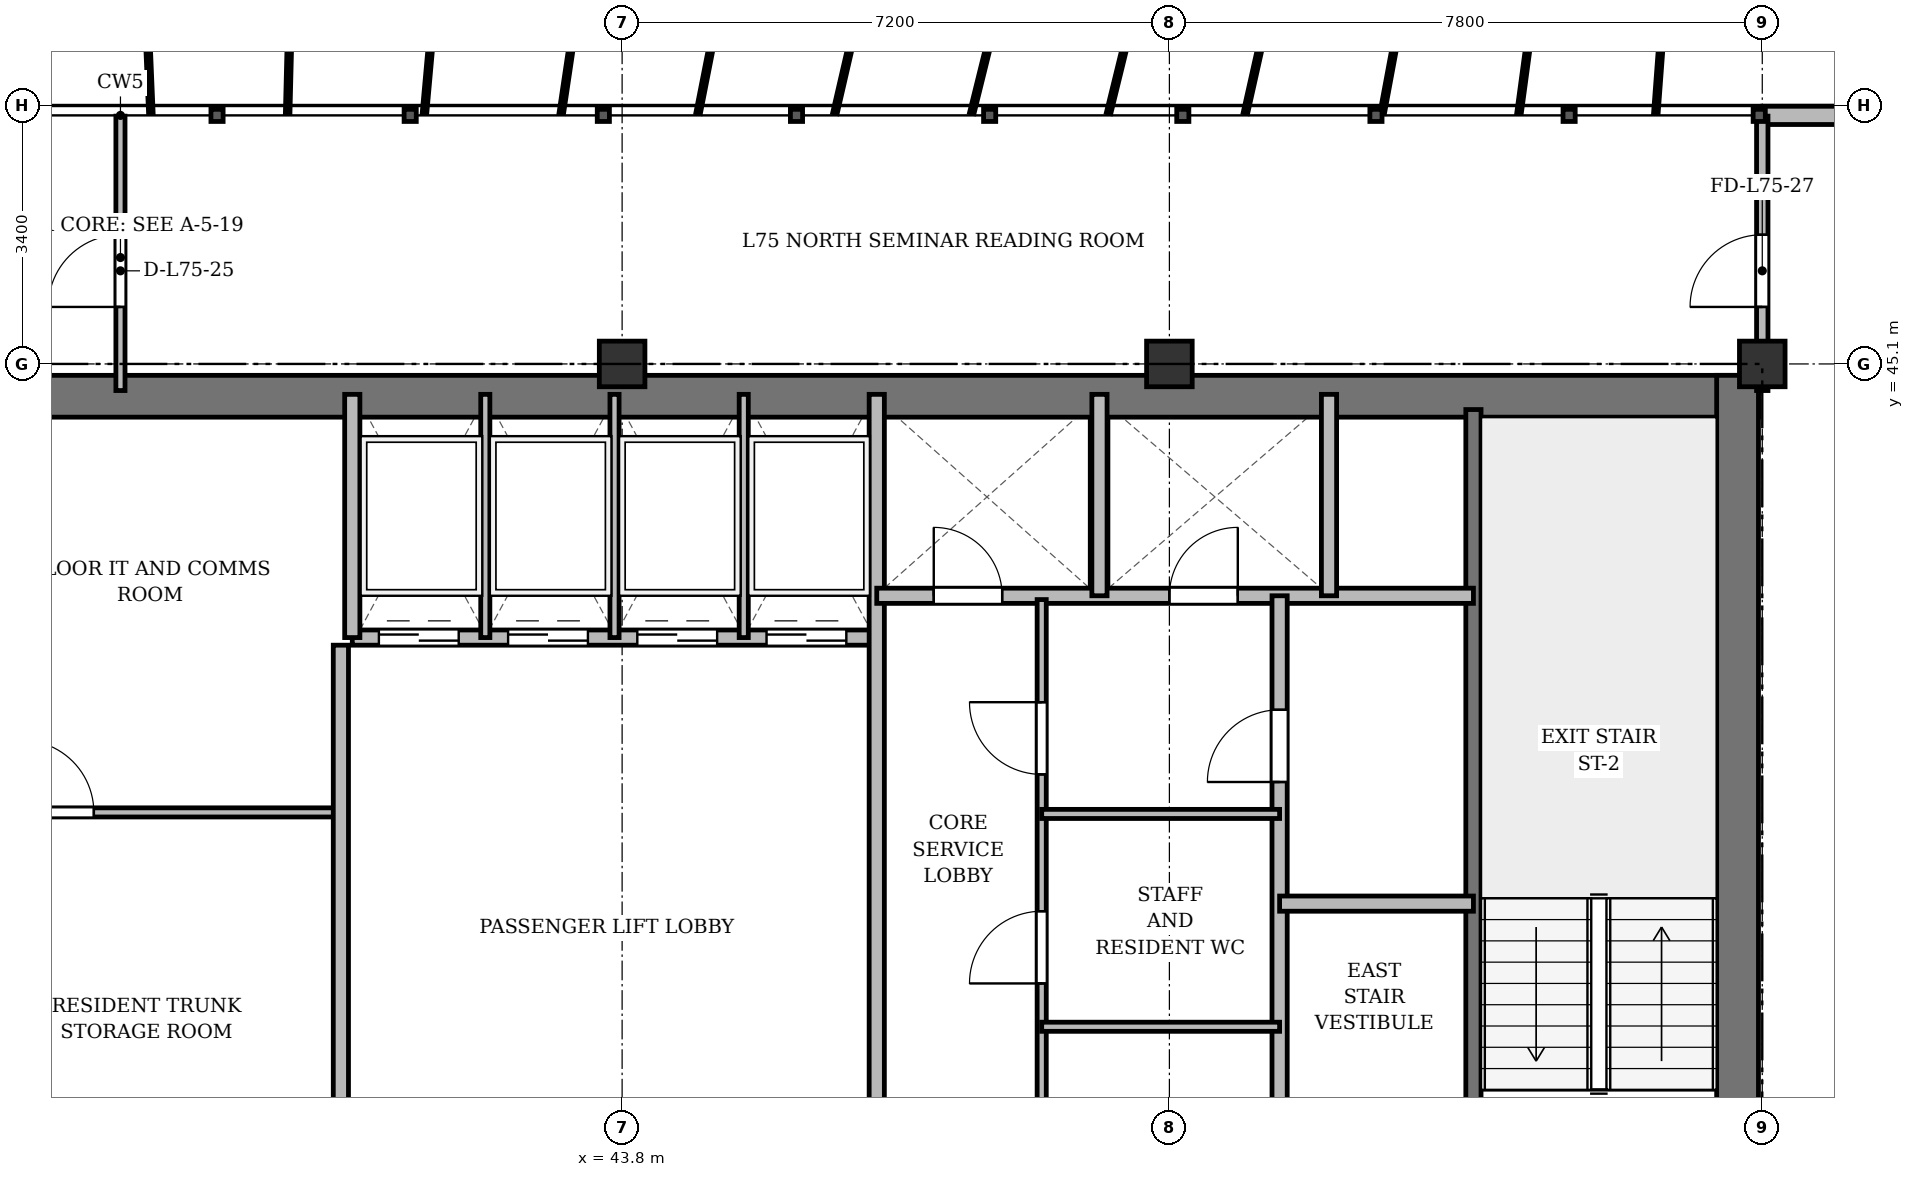
"""IFC4 building model, lengths in metres.
Left out: names, types, materials, properties, quantities, classifications, styles, units other than length and angle.
Written with IfcOpenShell. Run it as: python <this file> out.ifc"""

import sys

from ifc_helpers import new_model, si_unit, direction, frame, frame_2d, origin, origin_2d, place, context, subcontext, project, spatial, rectangle, extrude, source, transform, mapped, element, fill, save


model = new_model("IFC4")
c1 = context("Model", 3, precision=1e-05, world=origin(), true_north=direction((0.0, 1.0)))
c2 = subcontext(c1, "Body", "Model", "MODEL_VIEW")
j1 = project(units=[si_unit("LENGTHUNIT", "METRE"), si_unit("PLANEANGLEUNIT", "RADIAN")], contexts=[c1])
p1 = place(None, origin())
s1 = spatial("IfcSite", under=j1, at=p1, CompositionType="ELEMENT")
p2 = place(p1, origin())
s2 = spatial("IfcBuilding", under=s1, at=p2, CompositionType="ELEMENT")
p3 = place(p2, frame((0.0, 0.0, 288.3)))
s3 = spatial("IfcBuildingStorey", under=s2, at=p3, CompositionType="ELEMENT", Elevation=288.3)
m1 = source(origin(), c2, "Body", "SweptSolid", [
    extrude(rectangle(XDim=0.6, YDim=0.6, at=origin_2d()), origin(), (0.0, 0.0, 1.0), 3.6),
])
for number, where, z_axis, x_axis in (
    (1, (43.8, 45.1, 0.0), (0.0, 0.0, 1.0), (1.0, 0.0, 0.0)),
    (2, (51.0, 45.1, 0.0), (0.0, 0.0, 1.0), (1.0, 0.0, 0.0)),
    (3, (58.8, 45.1, 0.0), (0.0, 0.0, 1.0), (1.0, 0.0, 0.0)),
):
    element("IfcColumn", number, at=place(p3, frame(where, z_axis=z_axis, x_axis=x_axis)), inside=s3, PredefinedType="COLUMN", context=c2, shape_type="MappedRepresentation", body=[
        mapped(m1, transform((0.0, 0.0, 0.0), x_axis=(1.0, 0.0, 0.0), y_axis=(0.0, 1.0, 0.0), z_axis=(0.0, 0.0, 1.0), scale=1.0)),
    ])
p4 = place(p3, frame((58.8, 48.37, 0.0), z_axis=(0.0, 0.0, 1.0), x_axis=(1.0, 0.0, 0.0)))
e4 = element("IfcWall", 4, at=p4, inside=s3, PredefinedType="SOLIDWALL", context=c2, shape_type="SweptSolid", body=[
    extrude(rectangle(XDim=4.3, YDim=0.24, at=frame_2d((2.15, 0.0))), origin(), (0.0, 0.0, 1.0), 3.37),
])
p5 = place(p4, frame((1.475, 0.0, 0.9)))
e5 = element("IfcOpeningElement", 5, at=p5, cuts=e4, PredefinedType="OPENING", context=c2, shape_type="SweptSolid", body=[
    extrude(rectangle(XDim=1.35, YDim=1.5, at=frame_2d((0.675, 0.75))), frame((0.0, 0.13, 0.0), z_axis=(0.0, -1.0, 0.0), x_axis=(1.0, 0.0, 0.0)), (0.0, 0.0, 1.0), 0.26),
])
p6 = place(p3, frame((15.65, 44.675, 0.0), z_axis=(0.0, 0.0, 1.0), x_axis=(1.0, 0.0, 0.0)))
e6 = element("IfcWall", 6, at=p6, inside=s3, PredefinedType="SHEAR", context=c2, shape_type="SweptSolid", body=[
    extrude(rectangle(XDim=43.1, YDim=0.55, at=frame_2d((21.55, 0.0))), origin(), (0.0, 0.0, 1.0), 3.37),
])
p7 = place(p3, frame((58.475, 33.4, 0.0), z_axis=(0.0, 0.0, 1.0), x_axis=(0.0, 1.0, 0.0)))
e7 = element("IfcWall", 7, at=p7, inside=s3, PredefinedType="SHEAR", context=c2, shape_type="SweptSolid", body=[
    extrude(rectangle(XDim=11.55, YDim=0.55, at=frame_2d((5.775, 0.0))), origin(), (0.0, 0.0, 1.0), 3.37),
])
p8 = place(p3, frame((55.0, 33.4, 0.0), z_axis=(0.0, 0.0, 1.0), x_axis=(0.0, 1.0, 0.0)))
e8 = element("IfcWall", 8, at=p8, inside=s3, PredefinedType="SHEAR", context=c2, shape_type="SweptSolid", body=[
    extrude(rectangle(XDim=11.1, YDim=0.2, at=frame_2d((5.55, 0.0))), origin(), (0.0, 0.0, 1.0), 3.37),
])
p9 = place(p8, frame((0.85, 0.0, 0.0)))
e9 = element("IfcOpeningElement", 9, at=p9, cuts=e8, PredefinedType="OPENING", context=c2, shape_type="SweptSolid", body=[
    extrude(rectangle(XDim=1.1, YDim=2.15, at=frame_2d((0.55, 1.075))), frame((0.0, 0.11, 0.0), z_axis=(0.0, -1.0, 0.0), x_axis=(1.0, 0.0, 0.0)), (0.0, 0.0, 1.0), 0.22),
])
p10 = place(p3, frame((33.3, 39.2, 0.0), z_axis=(0.0, 0.0, 1.0), x_axis=(1.0, 0.0, 0.0)))
e10 = element("IfcWall", 10, at=p10, inside=s3, PredefinedType="PARTITIONING", context=c2, shape_type="SweptSolid", body=[
    extrude(rectangle(XDim=6.8, YDim=0.12, at=frame_2d((3.4, 0.0))), origin(), (0.0, 0.0, 1.0), 3.37),
])
p11 = place(p10, frame((2.6, 0.0, 0.0)))
e11 = element("IfcOpeningElement", 11, at=p11, cuts=e10, PredefinedType="OPENING", context=c2, shape_type="SweptSolid", body=[
    extrude(rectangle(XDim=0.95, YDim=2.15, at=frame_2d((0.475, 1.075))), frame((0.0, 0.07, 0.0), z_axis=(0.0, -1.0, 0.0), x_axis=(1.0, 0.0, 0.0)), (0.0, 0.0, 1.0), 0.14),
])
p12 = place(p3, frame((40.1, 33.4, 0.0), z_axis=(0.0, 0.0, 1.0), x_axis=(0.0, 1.0, 0.0)))
e12 = element("IfcWall", 12, at=p12, inside=s3, PredefinedType="SOLIDWALL", context=c2, shape_type="SweptSolid", body=[
    extrude(rectangle(XDim=8.0, YDim=0.2, at=frame_2d((4.0, 0.0))), origin(), (0.0, 0.0, 1.0), 2.92),
])
p13 = place(p3, frame((40.25, 41.5, 0.0), z_axis=(0.0, 0.0, 1.0), x_axis=(1.0, 0.0, 0.0)))
e13 = element("IfcWall", 13, at=p13, inside=s3, PredefinedType="SOLIDWALL", context=c2, shape_type="SweptSolid", body=[
    extrude(rectangle(XDim=6.9, YDim=0.2, at=frame_2d((3.45, 0.0))), origin(), (0.0, 0.0, 1.0), 3.37),
])
p14 = place(p13, frame((0.35, 0.0, 0.0)))
e14 = element("IfcOpeningElement", 14, at=p14, cuts=e13, PredefinedType="OPENING", context=c2, shape_type="SweptSolid", body=[
    extrude(rectangle(XDim=1.05, YDim=2.15, at=frame_2d((0.525, 1.075))), frame((0.0, 0.11, 0.0), z_axis=(0.0, -1.0, 0.0), x_axis=(1.0, 0.0, 0.0)), (0.0, 0.0, 1.0), 0.22),
])
p15 = place(p13, frame((2.05, 0.0, 0.0)))
e15 = element("IfcOpeningElement", 15, at=p15, cuts=e13, PredefinedType="OPENING", context=c2, shape_type="SweptSolid", body=[
    extrude(rectangle(XDim=1.05, YDim=2.15, at=frame_2d((0.525, 1.075))), frame((0.0, 0.11, 0.0), z_axis=(0.0, -1.0, 0.0), x_axis=(1.0, 0.0, 0.0)), (0.0, 0.0, 1.0), 0.22),
])
p16 = place(p13, frame((3.75, 0.0, 0.0)))
e16 = element("IfcOpeningElement", 16, at=p16, cuts=e13, PredefinedType="OPENING", context=c2, shape_type="SweptSolid", body=[
    extrude(rectangle(XDim=1.05, YDim=2.15, at=frame_2d((0.525, 1.075))), frame((0.0, 0.11, 0.0), z_axis=(0.0, -1.0, 0.0), x_axis=(1.0, 0.0, 0.0)), (0.0, 0.0, 1.0), 0.22),
])
p17 = place(p13, frame((5.45, 0.0, 0.0)))
e17 = element("IfcOpeningElement", 17, at=p17, cuts=e13, PredefinedType="OPENING", context=c2, shape_type="SweptSolid", body=[
    extrude(rectangle(XDim=1.05, YDim=2.15, at=frame_2d((0.525, 1.075))), frame((0.0, 0.11, 0.0), z_axis=(0.0, -1.0, 0.0), x_axis=(1.0, 0.0, 0.0)), (0.0, 0.0, 1.0), 0.22),
])
p18 = place(p3, frame((40.25, 41.5, 0.0), z_axis=(0.0, 0.0, 1.0), x_axis=(0.0, 1.0, 0.0)))
e18 = element("IfcWall", 18, at=p18, inside=s3, PredefinedType="SOLIDWALL", context=c2, shape_type="SweptSolid", body=[
    extrude(rectangle(XDim=3.2, YDim=0.2, at=frame_2d((1.6, 0.0))), origin(), (0.0, 0.0, 1.0), 3.37),
])
for number, where, z_axis, x_axis in (
    (19, (42.0, 41.5, 0.0), (0.0, 0.0, 1.0), (0.0, 1.0, 0.0)),
    (20, (43.7, 41.5, 0.0), (0.0, 0.0, 1.0), (0.0, 1.0, 0.0)),
    (21, (45.4, 41.5, 0.0), (0.0, 0.0, 1.0), (0.0, 1.0, 0.0)),
):
    element("IfcWall", number, at=place(p3, frame(where, z_axis=z_axis, x_axis=x_axis)), inside=s3, PredefinedType="PARTITIONING", context=c2, shape_type="SweptSolid", body=[
        extrude(rectangle(XDim=3.2, YDim=0.12, at=frame_2d((1.6, 0.0))), origin(), (0.0, 0.0, 1.0), 3.37),
    ])
p19 = place(p3, frame((47.15, 33.4, 0.0), z_axis=(0.0, 0.0, 1.0), x_axis=(0.0, 1.0, 0.0)))
e22 = element("IfcWall", 22, at=p19, inside=s3, PredefinedType="SOLIDWALL", context=c2, shape_type="SweptSolid", body=[
    extrude(rectangle(XDim=11.3, YDim=0.2, at=frame_2d((5.65, 0.0))), origin(), (0.0, 0.0, 1.0), 2.92),
])
p20 = place(p3, frame((47.15, 42.05, 0.0), z_axis=(0.0, 0.0, 1.0), x_axis=(1.0, 0.0, 0.0)))
e23 = element("IfcWall", 23, at=p20, inside=s3, PredefinedType="SOLIDWALL", context=c2, shape_type="SweptSolid", body=[
    extrude(rectangle(XDim=7.85, YDim=0.2, at=frame_2d((3.925, 0.0))), origin(), (0.0, 0.0, 1.0), 2.87),
])
p21 = place(p20, frame((0.75, 0.0, 0.0)))
e24 = element("IfcOpeningElement", 24, at=p21, cuts=e23, PredefinedType="OPENING", context=c2, shape_type="SweptSolid", body=[
    extrude(rectangle(XDim=0.9, YDim=2.1, at=frame_2d((0.45, 1.05))), frame((0.0, 0.11, 0.0), z_axis=(0.0, -1.0, 0.0), x_axis=(1.0, 0.0, 0.0)), (0.0, 0.0, 1.0), 0.22),
])
p22 = place(p20, frame((3.85, 0.0, 0.0)))
e25 = element("IfcOpeningElement", 25, at=p22, cuts=e23, PredefinedType="OPENING", context=c2, shape_type="SweptSolid", body=[
    extrude(rectangle(XDim=0.9, YDim=2.1, at=frame_2d((0.45, 1.05))), frame((0.0, 0.11, 0.0), z_axis=(0.0, -1.0, 0.0), x_axis=(1.0, 0.0, 0.0)), (0.0, 0.0, 1.0), 0.22),
])
for number, where, z_axis, x_axis in (
    (26, (50.08, 42.05, 0.0), (0.0, 0.0, 1.0), (0.0, 1.0, 0.0)),
    (27, (53.1, 42.05, 0.0), (0.0, 0.0, 1.0), (0.0, 1.0, 0.0)),
):
    element("IfcWall", number, at=place(p3, frame(where, z_axis=z_axis, x_axis=x_axis)), inside=s3, PredefinedType="SOLIDWALL", context=c2, shape_type="SweptSolid", body=[
        extrude(rectangle(XDim=2.65, YDim=0.2, at=frame_2d((1.325, 0.0))), origin(), (0.0, 0.0, 1.0), 3.37),
    ])
p23 = place(p3, frame((52.45, 33.4, 0.0), z_axis=(0.0, 0.0, 1.0), x_axis=(0.0, 1.0, 0.0)))
e28 = element("IfcWall", 28, at=p23, inside=s3, PredefinedType="PARTITIONING", context=c2, shape_type="SweptSolid", body=[
    extrude(rectangle(XDim=8.65, YDim=0.2, at=frame_2d((4.325, 0.0))), origin(), (0.0, 0.0, 1.0), 2.92),
])
p24 = place(p23, frame((6.2, 0.0, 0.0)))
e29 = element("IfcOpeningElement", 29, at=p24, cuts=e28, PredefinedType="OPENING", context=c2, shape_type="SweptSolid", body=[
    extrude(rectangle(XDim=0.95, YDim=2.15, at=frame_2d((0.475, 1.075))), frame((0.0, 0.11, 0.0), z_axis=(0.0, -1.0, 0.0), x_axis=(1.0, 0.0, 0.0)), (0.0, 0.0, 1.0), 0.22),
])
p25 = place(p3, frame((52.45, 38.0, 0.0), z_axis=(0.0, 0.0, 1.0), x_axis=(1.0, 0.0, 0.0)))
e30 = element("IfcWall", 30, at=p25, inside=s3, PredefinedType="PARTITIONING", context=c2, shape_type="SweptSolid", body=[
    extrude(rectangle(XDim=2.55, YDim=0.2, at=frame_2d((1.275, 0.0))), origin(), (0.0, 0.0, 1.0), 3.37),
])
p26 = place(p3, frame((49.32, 33.4, 0.0), z_axis=(0.0, 0.0, 1.0), x_axis=(0.0, 1.0, 0.0)))
e31 = element("IfcWall", 31, at=p26, inside=s3, PredefinedType="PARTITIONING", context=c2, shape_type="SweptSolid", body=[
    extrude(rectangle(XDim=8.6, YDim=0.12, at=frame_2d((4.3, 0.0))), origin(), (0.0, 0.0, 1.0), 2.92),
])
p27 = place(p26, frame((0.85, 0.0, 0.0)))
e32 = element("IfcOpeningElement", 32, at=p27, cuts=e31, PredefinedType="OPENING", context=c2, shape_type="SweptSolid", body=[
    extrude(rectangle(XDim=0.95, YDim=2.15, at=frame_2d((0.475, 1.075))), frame((0.0, 0.07, 0.0), z_axis=(0.0, -1.0, 0.0), x_axis=(1.0, 0.0, 0.0)), (0.0, 0.0, 1.0), 0.14),
])
p28 = place(p26, frame((3.55, 0.0, 0.0)))
e33 = element("IfcOpeningElement", 33, at=p28, cuts=e31, PredefinedType="OPENING", context=c2, shape_type="SweptSolid", body=[
    extrude(rectangle(XDim=0.95, YDim=2.15, at=frame_2d((0.475, 1.075))), frame((0.0, 0.07, 0.0), z_axis=(0.0, -1.0, 0.0), x_axis=(1.0, 0.0, 0.0)), (0.0, 0.0, 1.0), 0.14),
])
p29 = place(p26, frame((6.3, 0.0, 0.0)))
e34 = element("IfcOpeningElement", 34, at=p29, cuts=e31, PredefinedType="OPENING", context=c2, shape_type="SweptSolid", body=[
    extrude(rectangle(XDim=0.95, YDim=2.15, at=frame_2d((0.475, 1.075))), frame((0.0, 0.07, 0.0), z_axis=(0.0, -1.0, 0.0), x_axis=(1.0, 0.0, 0.0)), (0.0, 0.0, 1.0), 0.14),
])
for number, where, z_axis, x_axis in (
    (35, (49.32, 36.38, 0.0), (0.0, 0.0, 1.0), (1.0, 0.0, 0.0)),
    (36, (49.32, 39.18, 0.0), (0.0, 0.0, 1.0), (1.0, 0.0, 0.0)),
):
    element("IfcWall", number, at=place(p3, frame(where, z_axis=z_axis, x_axis=x_axis)), inside=s3, PredefinedType="PARTITIONING", context=c2, shape_type="SweptSolid", body=[
        extrude(rectangle(XDim=3.13, YDim=0.12, at=frame_2d((1.565, 0.0))), origin(), (0.0, 0.0, 1.0), 2.87),
    ])
p30 = place(p3, frame((37.2, 44.75, 0.0), z_axis=(0.0, 0.0, 1.0), x_axis=(0.0, 1.0, 0.0)))
e37 = element("IfcWall", 37, at=p30, inside=s3, PredefinedType="PARTITIONING", context=c2, shape_type="SweptSolid", body=[
    extrude(rectangle(XDim=3.61, YDim=0.12, at=frame_2d((1.805, 0.0))), origin(), (0.0, 0.0, 1.0), 2.92),
])
p31 = place(p30, frame((1.1, 0.0, 0.0)))
e38 = element("IfcOpeningElement", 38, at=p31, cuts=e37, PredefinedType="OPENING", context=c2, shape_type="SweptSolid", body=[
    extrude(rectangle(XDim=0.95, YDim=2.15, at=frame_2d((0.475, 1.075))), frame((0.0, 0.07, 0.0), z_axis=(0.0, -1.0, 0.0), x_axis=(1.0, 0.0, 0.0)), (0.0, 0.0, 1.0), 0.14),
])
p32 = place(p3, frame((58.8, 44.75, 0.0), z_axis=(0.0, 0.0, 1.0), x_axis=(0.0, 1.0, 0.0)))
e39 = element("IfcWall", 39, at=p32, inside=s3, PredefinedType="PARTITIONING", context=c2, shape_type="SweptSolid", body=[
    extrude(rectangle(XDim=3.61, YDim=0.15, at=frame_2d((1.805, 0.0))), origin(), (0.0, 0.0, 1.0), 2.87),
])
p33 = place(p32, frame((1.1, 0.0, 0.0)))
e40 = element("IfcOpeningElement", 40, at=p33, cuts=e39, PredefinedType="OPENING", context=c2, shape_type="SweptSolid", body=[
    extrude(rectangle(XDim=0.95, YDim=2.15, at=frame_2d((0.475, 1.075))), frame((0.0, 0.085, 0.0), z_axis=(0.0, -1.0, 0.0), x_axis=(1.0, 0.0, 0.0)), (0.0, 0.0, 1.0), 0.17),
])
m2 = source(origin(), c2, "Body", "SweptSolid", [
    extrude(rectangle(XDim=0.95, YDim=2.15, at=frame_2d((0.475, 1.075))), frame((0.0, 0.025, 0.0), z_axis=(0.0, -1.0, 0.0), x_axis=(1.0, 0.0, 0.0)), (0.0, 0.0, 1.0), 0.05),
])
p34 = place(p11, origin())
e41 = element("IfcDoor", 41, at=p34, inside=s3, OperationType="SINGLE_SWING_LEFT", PredefinedType="DOOR", context=c2, shape_type="MappedRepresentation", body=[
    mapped(m2, transform((0.0, 0.0, 0.0), x_axis=(1.0, 0.0, 0.0), y_axis=(0.0, 1.0, 0.0), z_axis=(0.0, 0.0, 1.0), scale=1.0)),
])
fill(e11, e41)
m3 = source(origin(), c2, "Body", "SweptSolid", [
    extrude(rectangle(XDim=1.05, YDim=2.15, at=frame_2d((0.525, 1.075))), frame((0.0, 0.025, 0.0), z_axis=(0.0, -1.0, 0.0), x_axis=(1.0, 0.0, 0.0)), (0.0, 0.0, 1.0), 0.05),
])
p35 = place(p14, origin())
e42 = element("IfcDoor", 42, at=p35, inside=s3, OperationType="DOUBLE_DOOR_SLIDING", PredefinedType="DOOR", context=c2, shape_type="MappedRepresentation", body=[
    mapped(m3, transform((0.0, 0.0, 0.0), x_axis=(1.0, 0.0, 0.0), y_axis=(0.0, 1.0, 0.0), z_axis=(0.0, 0.0, 1.0), scale=1.0)),
])
fill(e14, e42)
p36 = place(p15, origin())
e43 = element("IfcDoor", 43, at=p36, inside=s3, OperationType="DOUBLE_DOOR_SLIDING", PredefinedType="DOOR", context=c2, shape_type="MappedRepresentation", body=[
    mapped(m3, transform((0.0, 0.0, 0.0), x_axis=(1.0, 0.0, 0.0), y_axis=(0.0, 1.0, 0.0), z_axis=(0.0, 0.0, 1.0), scale=1.0)),
])
fill(e15, e43)
p37 = place(p16, origin())
e44 = element("IfcDoor", 44, at=p37, inside=s3, OperationType="DOUBLE_DOOR_SLIDING", PredefinedType="DOOR", context=c2, shape_type="MappedRepresentation", body=[
    mapped(m3, transform((0.0, 0.0, 0.0), x_axis=(1.0, 0.0, 0.0), y_axis=(0.0, 1.0, 0.0), z_axis=(0.0, 0.0, 1.0), scale=1.0)),
])
fill(e16, e44)
p38 = place(p17, origin())
e45 = element("IfcDoor", 45, at=p38, inside=s3, OperationType="DOUBLE_DOOR_SLIDING", PredefinedType="DOOR", context=c2, shape_type="MappedRepresentation", body=[
    mapped(m3, transform((0.0, 0.0, 0.0), x_axis=(1.0, 0.0, 0.0), y_axis=(0.0, 1.0, 0.0), z_axis=(0.0, 0.0, 1.0), scale=1.0)),
])
fill(e17, e45)
m4 = source(origin(), c2, "Body", "SweptSolid", [
    extrude(rectangle(XDim=0.9, YDim=2.1, at=frame_2d((0.45, 1.05))), frame((0.0, 0.025, 0.0), z_axis=(0.0, -1.0, 0.0), x_axis=(1.0, 0.0, 0.0)), (0.0, 0.0, 1.0), 0.05),
])
p39 = place(p21, origin())
e46 = element("IfcDoor", 46, at=p39, inside=s3, OperationType="SINGLE_SWING_LEFT", PredefinedType="DOOR", context=c2, shape_type="MappedRepresentation", body=[
    mapped(m4, transform((0.0, 0.0, 0.0), x_axis=(1.0, 0.0, 0.0), y_axis=(0.0, 1.0, 0.0), z_axis=(0.0, 0.0, 1.0), scale=1.0)),
])
fill(e24, e46)
p40 = place(p22, origin())
e47 = element("IfcDoor", 47, at=p40, inside=s3, OperationType="SINGLE_SWING_RIGHT", PredefinedType="DOOR", context=c2, shape_type="MappedRepresentation", body=[
    mapped(m4, transform((0.0, 0.0, 0.0), x_axis=(1.0, 0.0, 0.0), y_axis=(0.0, 1.0, 0.0), z_axis=(0.0, 0.0, 1.0), scale=1.0)),
])
fill(e25, e47)
p41 = place(p24, origin())
e48 = element("IfcDoor", 48, at=p41, inside=s3, OperationType="SINGLE_SWING_LEFT", PredefinedType="DOOR", context=c2, shape_type="MappedRepresentation", body=[
    mapped(m2, transform((0.0, 0.0, 0.0), x_axis=(1.0, 0.0, 0.0), y_axis=(0.0, 1.0, 0.0), z_axis=(0.0, 0.0, 1.0), scale=1.0)),
])
fill(e29, e48)
p42 = place(p28, origin())
e49 = element("IfcDoor", 49, at=p42, inside=s3, OperationType="SINGLE_SWING_LEFT", PredefinedType="DOOR", context=c2, shape_type="MappedRepresentation", body=[
    mapped(m2, transform((0.0, 0.0, 0.0), x_axis=(1.0, 0.0, 0.0), y_axis=(0.0, 1.0, 0.0), z_axis=(0.0, 0.0, 1.0), scale=1.0)),
])
fill(e33, e49)
p43 = place(p29, origin())
e50 = element("IfcDoor", 50, at=p43, inside=s3, OperationType="SINGLE_SWING_RIGHT", PredefinedType="DOOR", context=c2, shape_type="MappedRepresentation", body=[
    mapped(m2, transform((0.0, 0.0, 0.0), x_axis=(1.0, 0.0, 0.0), y_axis=(0.0, 1.0, 0.0), z_axis=(0.0, 0.0, 1.0), scale=1.0)),
])
fill(e34, e50)
p44 = place(p31, origin())
e51 = element("IfcDoor", 51, at=p44, inside=s3, OperationType="SINGLE_SWING_LEFT", PredefinedType="DOOR", context=c2, shape_type="MappedRepresentation", body=[
    mapped(m2, transform((0.0, 0.0, 0.0), x_axis=(1.0, 0.0, 0.0), y_axis=(0.0, 1.0, 0.0), z_axis=(0.0, 0.0, 1.0), scale=1.0)),
])
fill(e38, e51)
p45 = place(p33, origin())
e52 = element("IfcDoor", 52, at=p45, inside=s3, OperationType="SINGLE_SWING_LEFT", PredefinedType="DOOR", context=c2, shape_type="MappedRepresentation", body=[
    mapped(m2, transform((0.0, 0.0, 0.0), x_axis=(1.0, 0.0, 0.0), y_axis=(0.0, 1.0, 0.0), z_axis=(0.0, 0.0, 1.0), scale=1.0)),
])
fill(e40, e52)
save(model, sys.argv[1])
